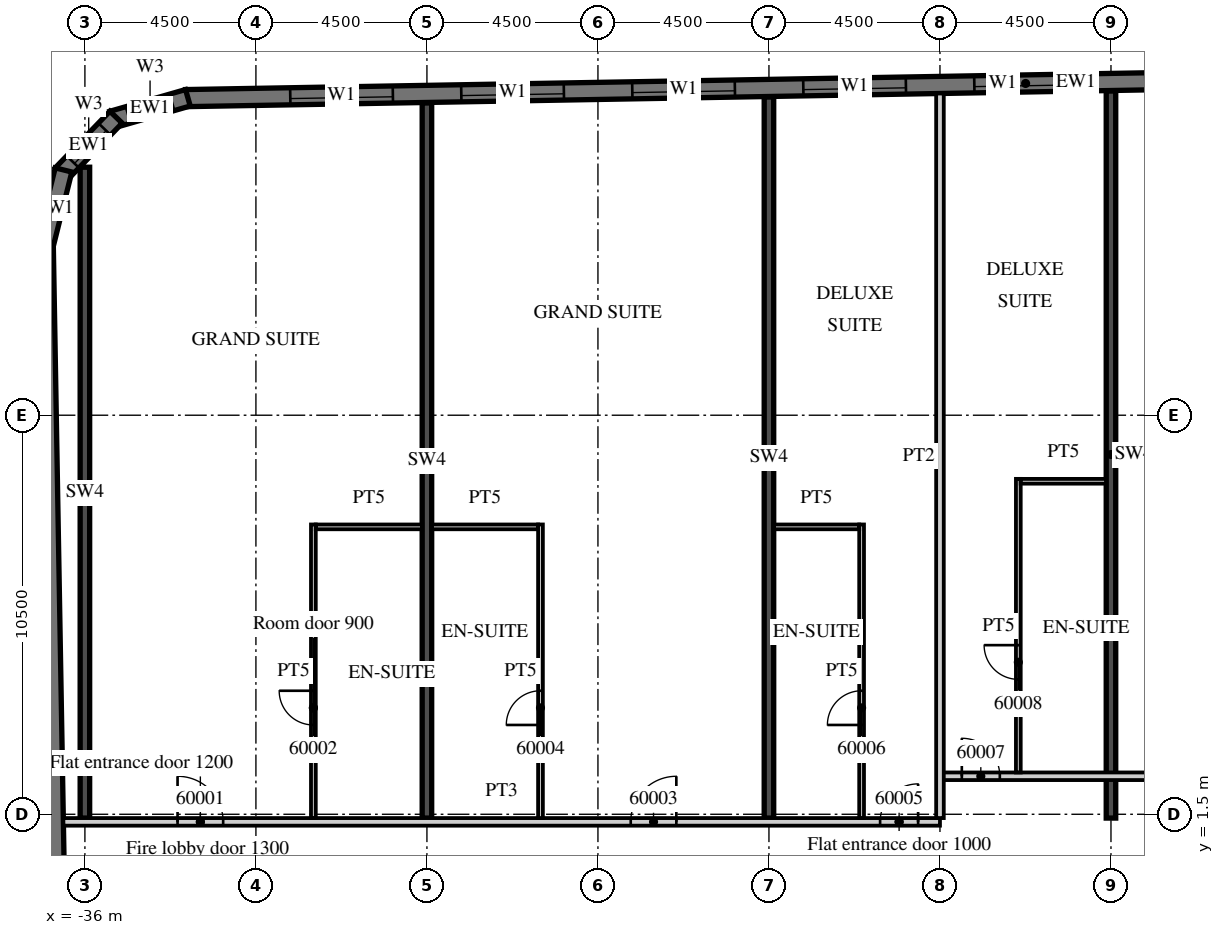
"""IFC4 building model, lengths in metres.
Left out: names, types, materials, properties, quantities, classifications, styles, units other than length and angle.
Written with IfcOpenShell. Run it as: python <this file> out.ifc"""

import sys

from ifc_helpers import new_model, si_unit, direction, frame, frame_2d, origin, place, context, subcontext, project, spatial, polyline, rectangle, outline, extrude, element, fill, save


model = new_model("IFC4")
c1 = context("Model", 3, precision=1e-05, world=origin(), true_north=direction((0.0, 1.0)))
c2 = subcontext(c1, "Body", "Model", "MODEL_VIEW")
j1 = project(units=[si_unit("LENGTHUNIT", "METRE"), si_unit("PLANEANGLEUNIT", "RADIAN")], contexts=[c1])
p1 = place(None, origin())
s1 = spatial("IfcSite", under=j1, at=p1, CompositionType="ELEMENT")
p2 = place(p1, origin())
s2 = spatial("IfcBuilding", under=s1, at=p2, CompositionType="ELEMENT")
p3 = place(p2, frame((0.0, 0.0, 244.1)))
s3 = spatial("IfcBuildingStorey", under=s2, at=p3, CompositionType="ELEMENT", Elevation=244.1)
p4 = place(p3, frame((-36.0, 1.4, 0.0), z_axis=(0.0, 0.0, 1.0), x_axis=(0.0, 1.0, 0.0)))
e1 = element("IfcWall", 1, at=p4, inside=s3, PredefinedType="SHEAR", context=c2, shape_type="SweptSolid", body=[
    extrude(rectangle(XDim=17.125, YDim=0.25, at=frame_2d((8.563, 0.0))), origin(), (0.0, 0.0, 1.0), 3.3),
])
p5 = place(p3, frame((-27.0, 1.4, 0.0), z_axis=(0.0, 0.0, 1.0), x_axis=(0.0, 1.0, 0.0)))
e2 = element("IfcWall", 2, at=p5, inside=s3, PredefinedType="SHEAR", context=c2, shape_type="SweptSolid", body=[
    extrude(rectangle(XDim=18.817, YDim=0.25, at=frame_2d((9.409, 0.0))), origin(), (0.0, 0.0, 1.0), 3.3),
])
p6 = place(p3, frame((-18.0, 1.4, 0.0), z_axis=(0.0, 0.0, 1.0), x_axis=(0.0, 1.0, 0.0)))
e3 = element("IfcWall", 3, at=p6, inside=s3, PredefinedType="SHEAR", context=c2, shape_type="SweptSolid", body=[
    extrude(rectangle(XDim=18.974, YDim=0.25, at=frame_2d((9.487, 0.0))), origin(), (0.0, 0.0, 1.0), 3.3),
])
p7 = place(p3, frame((-9.0, 1.4, 0.0), z_axis=(0.0, 0.0, 1.0), x_axis=(0.0, 1.0, 0.0)))
e4 = element("IfcWall", 4, at=p7, inside=s3, PredefinedType="SHEAR", context=c2, shape_type="SweptSolid", body=[
    extrude(rectangle(XDim=19.132, YDim=0.25, at=frame_2d((9.566, 0.0))), origin(), (0.0, 0.0, 1.0), 3.3),
])
p8 = place(p3, frame((-37.057, 16.503, 0.0), z_axis=(0.0, 0.0, 1.0), x_axis=(0.017452279857, -0.999847697366, 0.0)))
e5 = element("IfcWall", 5, at=p8, inside=s3, PredefinedType="SOLIDWALL", context=c2, shape_type="SweptSolid", body=[
    extrude(rectangle(XDim=33.0, YDim=0.45, at=frame_2d((16.5, 0.0))), origin(), (0.0, 0.0, 1.0), 3.02),
])
p9 = place(p3, frame((13.504, 21.161, 0.0), z_axis=(0.0, 0.0, 1.0), x_axis=(-0.999847763257, -0.017448504532, 0.0)))
e6 = element("IfcWall", 6, at=p9, inside=s3, PredefinedType="SOLIDWALL", context=c2, shape_type="SweptSolid", body=[
    extrude(rectangle(XDim=46.859, YDim=0.45, at=frame_2d((23.43, 0.0))), origin(), (0.0, 0.0, 1.0), 3.02),
])
p10 = place(p9, frame((0.9, 0.0, 0.45)))
e7 = element("IfcOpeningElement", 7, at=p10, cuts=e6, PredefinedType="OPENING", context=c2, shape_type="SweptSolid", body=[
    extrude(rectangle(XDim=2.7, YDim=2.25, at=frame_2d((1.35, 1.125))), frame((0.0, 0.235, 0.0), z_axis=(0.0, -1.0, 0.0), x_axis=(1.0, 0.0, 0.0)), (0.0, 0.0, 1.0), 0.47),
])
p11 = place(p9, frame((5.401, 0.0, 0.45)))
e8 = element("IfcOpeningElement", 8, at=p11, cuts=e6, PredefinedType="OPENING", context=c2, shape_type="SweptSolid", body=[
    extrude(rectangle(XDim=2.7, YDim=2.25, at=frame_2d((1.35, 1.125))), frame((0.0, 0.235, 0.0), z_axis=(0.0, -1.0, 0.0), x_axis=(1.0, 0.0, 0.0)), (0.0, 0.0, 1.0), 0.47),
])
p12 = place(p9, frame((9.902, 0.0, 0.45)))
e9 = element("IfcOpeningElement", 9, at=p12, cuts=e6, PredefinedType="OPENING", context=c2, shape_type="SweptSolid", body=[
    extrude(rectangle(XDim=2.7, YDim=2.25, at=frame_2d((1.35, 1.125))), frame((0.0, 0.235, 0.0), z_axis=(0.0, -1.0, 0.0), x_axis=(1.0, 0.0, 0.0)), (0.0, 0.0, 1.0), 0.47),
])
p13 = place(p9, frame((14.402, 0.0, 0.45)))
e10 = element("IfcOpeningElement", 10, at=p13, cuts=e6, PredefinedType="OPENING", context=c2, shape_type="SweptSolid", body=[
    extrude(rectangle(XDim=2.7, YDim=2.25, at=frame_2d((1.35, 1.125))), frame((0.0, 0.235, 0.0), z_axis=(0.0, -1.0, 0.0), x_axis=(1.0, 0.0, 0.0)), (0.0, 0.0, 1.0), 0.47),
])
p14 = place(p9, frame((18.903, 0.0, 0.45)))
e11 = element("IfcOpeningElement", 11, at=p14, cuts=e6, PredefinedType="OPENING", context=c2, shape_type="SweptSolid", body=[
    extrude(rectangle(XDim=2.7, YDim=2.25, at=frame_2d((1.35, 1.125))), frame((0.0, 0.235, 0.0), z_axis=(0.0, -1.0, 0.0), x_axis=(1.0, 0.0, 0.0)), (0.0, 0.0, 1.0), 0.47),
])
p15 = place(p9, frame((23.404, 0.0, 0.45)))
e12 = element("IfcOpeningElement", 12, at=p15, cuts=e6, PredefinedType="OPENING", context=c2, shape_type="SweptSolid", body=[
    extrude(rectangle(XDim=2.7, YDim=2.25, at=frame_2d((1.35, 1.125))), frame((0.0, 0.235, 0.0), z_axis=(0.0, -1.0, 0.0), x_axis=(1.0, 0.0, 0.0)), (0.0, 0.0, 1.0), 0.47),
])
p16 = place(p9, frame((27.904, 0.0, 0.45)))
e13 = element("IfcOpeningElement", 13, at=p16, cuts=e6, PredefinedType="OPENING", context=c2, shape_type="SweptSolid", body=[
    extrude(rectangle(XDim=2.7, YDim=2.25, at=frame_2d((1.35, 1.125))), frame((0.0, 0.235, 0.0), z_axis=(0.0, -1.0, 0.0), x_axis=(1.0, 0.0, 0.0)), (0.0, 0.0, 1.0), 0.47),
])
p17 = place(p9, frame((32.405, 0.0, 0.45)))
e14 = element("IfcOpeningElement", 14, at=p17, cuts=e6, PredefinedType="OPENING", context=c2, shape_type="SweptSolid", body=[
    extrude(rectangle(XDim=2.7, YDim=2.25, at=frame_2d((1.35, 1.125))), frame((0.0, 0.235, 0.0), z_axis=(0.0, -1.0, 0.0), x_axis=(1.0, 0.0, 0.0)), (0.0, 0.0, 1.0), 0.47),
])
p18 = place(p9, frame((36.906, 0.0, 0.45)))
e15 = element("IfcOpeningElement", 15, at=p18, cuts=e6, PredefinedType="OPENING", context=c2, shape_type="SweptSolid", body=[
    extrude(rectangle(XDim=2.7, YDim=2.25, at=frame_2d((1.35, 1.125))), frame((0.0, 0.235, 0.0), z_axis=(0.0, -1.0, 0.0), x_axis=(1.0, 0.0, 0.0)), (0.0, 0.0, 1.0), 0.47),
])
p19 = place(p9, frame((41.406, 0.0, 0.45)))
e16 = element("IfcOpeningElement", 16, at=p19, cuts=e6, PredefinedType="OPENING", context=c2, shape_type="SweptSolid", body=[
    extrude(rectangle(XDim=2.7, YDim=2.25, at=frame_2d((1.35, 1.125))), frame((0.0, 0.235, 0.0), z_axis=(0.0, -1.0, 0.0), x_axis=(1.0, 0.0, 0.0)), (0.0, 0.0, 1.0), 0.47),
])
p20 = place(p3, frame((-33.29, 20.352, 0.0), z_axis=(0.0, 0.0, 1.0), x_axis=(-0.961247584925, -0.275686562016, 0.0)))
e17 = element("IfcWall", 17, at=p20, inside=s3, PredefinedType="SOLIDWALL", context=c2, shape_type="SweptSolid", body=[
    extrude(outline(polyline([(0.0, -0.225), (2.071, -0.225), (1.95, 0.225), (0.121, 0.225), (0.0, -0.225)])), origin(), (0.0, 0.0, 1.0), 3.02),
])
p21 = place(p20, frame((0.435, 0.0, 0.45)))
e18 = element("IfcOpeningElement", 18, at=p21, cuts=e17, PredefinedType="OPENING", context=c2, shape_type="SweptSolid", body=[
    extrude(rectangle(XDim=1.2, YDim=2.25, at=frame_2d((0.6, 1.125))), frame((0.0, 0.235, 0.0), z_axis=(0.0, -1.0, 0.0), x_axis=(1.0, 0.0, 0.0)), (0.0, 0.0, 1.0), 0.47),
])
p22 = place(p3, frame((-35.181, 19.842, 0.0), z_axis=(0.0, 0.0, 1.0), x_axis=(-0.694678672846, -0.719320193998, 0.0)))
e19 = element("IfcWall", 19, at=p22, inside=s3, PredefinedType="SOLIDWALL", context=c2, shape_type="SweptSolid", body=[
    extrude(outline(polyline([(0.0, -0.225), (2.071, -0.225), (1.95, 0.225), (0.121, 0.225), (0.0, -0.225)])), origin(), (0.0, 0.0, 1.0), 3.02),
])
p23 = place(p22, frame((0.435, 0.0, 0.45)))
e20 = element("IfcOpeningElement", 20, at=p23, cuts=e19, PredefinedType="OPENING", context=c2, shape_type="SweptSolid", body=[
    extrude(rectangle(XDim=1.2, YDim=2.25, at=frame_2d((0.6, 1.125))), frame((0.0, 0.235, 0.0), z_axis=(0.0, -1.0, 0.0), x_axis=(1.0, 0.0, 0.0)), (0.0, 0.0, 1.0), 0.47),
])
p24 = place(p3, frame((-36.563, 18.454, 0.0), z_axis=(0.0, 0.0, 1.0), x_axis=(-0.241869623482, -0.970308757683, 0.0)))
e21 = element("IfcWall", 21, at=p24, inside=s3, PredefinedType="SOLIDWALL", context=c2, shape_type="SweptSolid", body=[
    extrude(outline(polyline([(-0.0, -0.225), (2.07, -0.225), (1.95, 0.225), (0.12, 0.225), (-0.0, -0.225)])), origin(), (0.0, 0.0, 1.0), 3.02),
])
p25 = place(p3, frame((-36.566, 1.3, 0.0), z_axis=(0.0, 0.0, 1.0), x_axis=(1.0, 0.0, 0.0)))
e22 = element("IfcWall", 22, at=p25, inside=s3, PredefinedType="PARTITIONING", context=c2, shape_type="SweptSolid", body=[
    extrude(rectangle(XDim=23.066, YDim=0.2, at=frame_2d((11.533, 0.0))), origin(), (0.0, 0.0, 1.0), 3.02),
])
p26 = place(p25, frame((3.004, 0.0, 0.0)))
e23 = element("IfcOpeningElement", 23, at=p26, cuts=e22, PredefinedType="OPENING", context=c2, shape_type="SweptSolid", body=[
    extrude(rectangle(XDim=1.2, YDim=2.1, at=frame_2d((0.6, 1.05))), frame((0.0, 0.11, 0.0), z_axis=(0.0, -1.0, 0.0), x_axis=(1.0, 0.0, 0.0)), (0.0, 0.0, 1.0), 0.22),
])
p27 = place(p25, frame((14.929, 0.0, 0.0)))
e24 = element("IfcOpeningElement", 24, at=p27, cuts=e22, PredefinedType="OPENING", context=c2, shape_type="SweptSolid", body=[
    extrude(rectangle(XDim=1.2, YDim=2.1, at=frame_2d((0.6, 1.05))), frame((0.0, 0.11, 0.0), z_axis=(0.0, -1.0, 0.0), x_axis=(1.0, 0.0, 0.0)), (0.0, 0.0, 1.0), 0.22),
])
p28 = place(p25, frame((21.491, 0.0, 0.0)))
e25 = element("IfcOpeningElement", 25, at=p28, cuts=e22, PredefinedType="OPENING", context=c2, shape_type="SweptSolid", body=[
    extrude(rectangle(XDim=1.0, YDim=2.1, at=frame_2d((0.5, 1.05))), frame((0.0, 0.11, 0.0), z_axis=(0.0, -1.0, 0.0), x_axis=(1.0, 0.0, 0.0)), (0.0, 0.0, 1.0), 0.22),
])
p29 = place(p3, frame((-13.5, 2.5, 0.0), z_axis=(0.0, 0.0, 1.0), x_axis=(1.0, 0.0, 0.0)))
e26 = element("IfcWall", 26, at=p29, inside=s3, PredefinedType="PARTITIONING", context=c2, shape_type="SweptSolid", body=[
    extrude(rectangle(XDim=27.0, YDim=0.2, at=frame_2d((13.5, 0.0))), origin(), (0.0, 0.0, 1.0), 3.02),
])
p30 = place(p29, frame((0.575, 0.0, 0.0)))
e27 = element("IfcOpeningElement", 27, at=p30, cuts=e26, PredefinedType="OPENING", context=c2, shape_type="SweptSolid", body=[
    extrude(rectangle(XDim=1.0, YDim=2.1, at=frame_2d((0.5, 1.05))), frame((0.0, 0.11, 0.0), z_axis=(0.0, -1.0, 0.0), x_axis=(1.0, 0.0, 0.0)), (0.0, 0.0, 1.0), 0.22),
])
p31 = place(p29, frame((6.938, 0.0, 0.0)))
e28 = element("IfcOpeningElement", 28, at=p31, cuts=e26, PredefinedType="OPENING", context=c2, shape_type="SweptSolid", body=[
    extrude(rectangle(XDim=1.2, YDim=2.1, at=frame_2d((0.6, 1.05))), frame((0.0, 0.11, 0.0), z_axis=(0.0, -1.0, 0.0), x_axis=(1.0, 0.0, 0.0)), (0.0, 0.0, 1.0), 0.22),
])
p32 = place(p29, frame((15.938, 0.0, 0.0)))
e29 = element("IfcOpeningElement", 29, at=p32, cuts=e26, PredefinedType="OPENING", context=c2, shape_type="SweptSolid", body=[
    extrude(rectangle(XDim=1.2, YDim=2.1, at=frame_2d((0.6, 1.05))), frame((0.0, 0.11, 0.0), z_axis=(0.0, -1.0, 0.0), x_axis=(1.0, 0.0, 0.0)), (0.0, 0.0, 1.0), 0.22),
])
p33 = place(p29, frame((23.075, 0.0, 0.0)))
e30 = element("IfcOpeningElement", 30, at=p33, cuts=e26, PredefinedType="OPENING", context=c2, shape_type="SweptSolid", body=[
    extrude(rectangle(XDim=1.0, YDim=2.1, at=frame_2d((0.5, 1.05))), frame((0.0, 0.11, 0.0), z_axis=(0.0, -1.0, 0.0), x_axis=(1.0, 0.0, 0.0)), (0.0, 0.0, 1.0), 0.22),
])
p34 = place(p3, frame((-29.988, 1.4, 0.0), z_axis=(0.0, 0.0, 1.0), x_axis=(0.0, 1.0, 0.0)))
e31 = element("IfcWall", 31, at=p34, inside=s3, PredefinedType="PARTITIONING", context=c2, shape_type="SweptSolid", body=[
    extrude(rectangle(XDim=7.725, YDim=0.125, at=frame_2d((3.863, 0.0))), origin(), (0.0, 0.0, 1.0), 3.02),
])
p35 = place(p34, frame((2.45, 0.0, 0.0)))
e32 = element("IfcOpeningElement", 32, at=p35, cuts=e31, PredefinedType="OPENING", context=c2, shape_type="SweptSolid", body=[
    extrude(rectangle(XDim=0.9, YDim=2.1, at=frame_2d((0.45, 1.05))), frame((0.0, 0.073, 0.0), z_axis=(0.0, -1.0, 0.0), x_axis=(1.0, 0.0, 0.0)), (0.0, 0.0, 1.0), 0.145),
])
p36 = place(p3, frame((-29.925, 9.062, 0.0), z_axis=(0.0, 0.0, 1.0), x_axis=(1.0, 0.0, 0.0)))
e33 = element("IfcWall", 33, at=p36, inside=s3, PredefinedType="PARTITIONING", context=c2, shape_type="SweptSolid", body=[
    extrude(rectangle(XDim=2.8, YDim=0.125, at=frame_2d((1.4, 0.0))), origin(), (0.0, 0.0, 1.0), 3.02),
])
p37 = place(p3, frame((-24.012, 1.4, 0.0), z_axis=(0.0, 0.0, 1.0), x_axis=(0.0, 1.0, 0.0)))
e34 = element("IfcWall", 34, at=p37, inside=s3, PredefinedType="PARTITIONING", context=c2, shape_type="SweptSolid", body=[
    extrude(rectangle(XDim=7.725, YDim=0.125, at=frame_2d((3.863, 0.0))), origin(), (0.0, 0.0, 1.0), 3.02),
])
p38 = place(p37, frame((2.45, 0.0, 0.0)))
e35 = element("IfcOpeningElement", 35, at=p38, cuts=e34, PredefinedType="OPENING", context=c2, shape_type="SweptSolid", body=[
    extrude(rectangle(XDim=0.9, YDim=2.1, at=frame_2d((0.45, 1.05))), frame((0.0, 0.073, 0.0), z_axis=(0.0, -1.0, 0.0), x_axis=(1.0, 0.0, 0.0)), (0.0, 0.0, 1.0), 0.145),
])
p39 = place(p3, frame((-26.875, 9.062, 0.0), z_axis=(0.0, 0.0, 1.0), x_axis=(1.0, 0.0, 0.0)))
e36 = element("IfcWall", 36, at=p39, inside=s3, PredefinedType="PARTITIONING", context=c2, shape_type="SweptSolid", body=[
    extrude(rectangle(XDim=2.8, YDim=0.125, at=frame_2d((1.4, 0.0))), origin(), (0.0, 0.0, 1.0), 3.02),
])
p40 = place(p3, frame((-13.5, 1.4, 0.0), z_axis=(0.0, 0.0, 1.0), x_axis=(0.0, 1.0, 0.0)))
e37 = element("IfcWall", 37, at=p40, inside=s3, PredefinedType="PARTITIONING", context=c2, shape_type="SweptSolid", body=[
    extrude(rectangle(XDim=19.065, YDim=0.2, at=frame_2d((9.533, 0.0))), origin(), (0.0, 0.0, 1.0), 3.02),
])
p41 = place(p3, frame((-15.562, 1.4, 0.0), z_axis=(0.0, 0.0, 1.0), x_axis=(0.0, 1.0, 0.0)))
e38 = element("IfcWall", 38, at=p41, inside=s3, PredefinedType="PARTITIONING", context=c2, shape_type="SweptSolid", body=[
    extrude(rectangle(XDim=7.725, YDim=0.125, at=frame_2d((3.863, 0.0))), origin(), (0.0, 0.0, 1.0), 3.02),
])
p42 = place(p41, frame((2.45, 0.0, 0.0)))
e39 = element("IfcOpeningElement", 39, at=p42, cuts=e38, PredefinedType="OPENING", context=c2, shape_type="SweptSolid", body=[
    extrude(rectangle(XDim=0.9, YDim=2.1, at=frame_2d((0.45, 1.05))), frame((0.0, 0.073, 0.0), z_axis=(0.0, -1.0, 0.0), x_axis=(1.0, 0.0, 0.0)), (0.0, 0.0, 1.0), 0.145),
])
p43 = place(p3, frame((-17.875, 9.062, 0.0), z_axis=(0.0, 0.0, 1.0), x_axis=(1.0, 0.0, 0.0)))
e40 = element("IfcWall", 40, at=p43, inside=s3, PredefinedType="PARTITIONING", context=c2, shape_type="SweptSolid", body=[
    extrude(rectangle(XDim=2.25, YDim=0.125, at=frame_2d((1.125, 0.0))), origin(), (0.0, 0.0, 1.0), 3.02),
])
p44 = place(p3, frame((-11.438, 2.6, 0.0), z_axis=(0.0, 0.0, 1.0), x_axis=(0.0, 1.0, 0.0)))
e41 = element("IfcWall", 41, at=p44, inside=s3, PredefinedType="PARTITIONING", context=c2, shape_type="SweptSolid", body=[
    extrude(rectangle(XDim=7.725, YDim=0.125, at=frame_2d((3.862, 0.0))), origin(), (0.0, 0.0, 1.0), 3.02),
])
p45 = place(p44, frame((2.45, 0.0, 0.0)))
e42 = element("IfcOpeningElement", 42, at=p45, cuts=e41, PredefinedType="OPENING", context=c2, shape_type="SweptSolid", body=[
    extrude(rectangle(XDim=0.9, YDim=2.1, at=frame_2d((0.45, 1.05))), frame((0.0, 0.073, 0.0), z_axis=(0.0, -1.0, 0.0), x_axis=(1.0, 0.0, 0.0)), (0.0, 0.0, 1.0), 0.145),
])
p46 = place(p3, frame((-11.375, 10.262, 0.0), z_axis=(0.0, 0.0, 1.0), x_axis=(1.0, 0.0, 0.0)))
e43 = element("IfcWall", 43, at=p46, inside=s3, PredefinedType="PARTITIONING", context=c2, shape_type="SweptSolid", body=[
    extrude(rectangle(XDim=2.25, YDim=0.125, at=frame_2d((1.125, 0.0))), origin(), (0.0, 0.0, 1.0), 3.02),
])
p47 = place(p15, origin())
e44 = element("IfcWindow", 44, at=p47, inside=s3, PartitioningType="SINGLE_PANEL", PredefinedType="WINDOW", context=c2, shape_type="SweptSolid", body=[
    extrude(rectangle(XDim=2.7, YDim=2.25, at=frame_2d((1.35, 1.125))), frame((0.0, 0.09, 0.0), z_axis=(0.0, -1.0, 0.0), x_axis=(1.0, 0.0, 0.0)), (0.0, 0.0, 1.0), 0.06),
])
fill(e12, e44)
p48 = place(p16, origin())
e45 = element("IfcWindow", 45, at=p48, inside=s3, PartitioningType="SINGLE_PANEL", PredefinedType="WINDOW", context=c2, shape_type="SweptSolid", body=[
    extrude(rectangle(XDim=2.7, YDim=2.25, at=frame_2d((1.35, 1.125))), frame((0.0, 0.09, 0.0), z_axis=(0.0, -1.0, 0.0), x_axis=(1.0, 0.0, 0.0)), (0.0, 0.0, 1.0), 0.06),
])
fill(e13, e45)
p49 = place(p17, origin())
e46 = element("IfcWindow", 46, at=p49, inside=s3, PartitioningType="SINGLE_PANEL", PredefinedType="WINDOW", context=c2, shape_type="SweptSolid", body=[
    extrude(rectangle(XDim=2.7, YDim=2.25, at=frame_2d((1.35, 1.125))), frame((0.0, 0.09, 0.0), z_axis=(0.0, -1.0, 0.0), x_axis=(1.0, 0.0, 0.0)), (0.0, 0.0, 1.0), 0.06),
])
fill(e14, e46)
p50 = place(p18, origin())
e47 = element("IfcWindow", 47, at=p50, inside=s3, PartitioningType="SINGLE_PANEL", PredefinedType="WINDOW", context=c2, shape_type="SweptSolid", body=[
    extrude(rectangle(XDim=2.7, YDim=2.25, at=frame_2d((1.35, 1.125))), frame((0.0, 0.09, 0.0), z_axis=(0.0, -1.0, 0.0), x_axis=(1.0, 0.0, 0.0)), (0.0, 0.0, 1.0), 0.06),
])
fill(e15, e47)
p51 = place(p19, origin())
e48 = element("IfcWindow", 48, at=p51, inside=s3, PartitioningType="SINGLE_PANEL", PredefinedType="WINDOW", context=c2, shape_type="SweptSolid", body=[
    extrude(rectangle(XDim=2.7, YDim=2.25, at=frame_2d((1.35, 1.125))), frame((0.0, 0.09, 0.0), z_axis=(0.0, -1.0, 0.0), x_axis=(1.0, 0.0, 0.0)), (0.0, 0.0, 1.0), 0.06),
])
fill(e16, e48)
p52 = place(p21, origin())
e49 = element("IfcWindow", 49, at=p52, inside=s3, PartitioningType="SINGLE_PANEL", PredefinedType="WINDOW", context=c2, shape_type="SweptSolid", body=[
    extrude(rectangle(XDim=1.2, YDim=2.25, at=frame_2d((0.6, 1.125))), frame((0.0, 0.09, 0.0), z_axis=(0.0, -1.0, 0.0), x_axis=(1.0, 0.0, 0.0)), (0.0, 0.0, 1.0), 0.06),
])
fill(e18, e49)
p53 = place(p23, origin())
e50 = element("IfcWindow", 50, at=p53, inside=s3, PartitioningType="SINGLE_PANEL", PredefinedType="WINDOW", context=c2, shape_type="SweptSolid", body=[
    extrude(rectangle(XDim=1.2, YDim=2.25, at=frame_2d((0.6, 1.125))), frame((0.0, 0.09, 0.0), z_axis=(0.0, -1.0, 0.0), x_axis=(1.0, 0.0, 0.0)), (0.0, 0.0, 1.0), 0.06),
])
fill(e20, e50)
p54 = place(p26, origin())
e51 = element("IfcDoor", 51, at=p54, inside=s3, OperationType="SINGLE_SWING_LEFT", PredefinedType="DOOR", context=c2, shape_type="SweptSolid", body=[
    extrude(rectangle(XDim=1.2, YDim=2.1, at=frame_2d((0.6, 1.05))), frame((0.0, 0.025, 0.0), z_axis=(0.0, -1.0, 0.0), x_axis=(1.0, 0.0, 0.0)), (0.0, 0.0, 1.0), 0.05),
])
fill(e23, e51)
p55 = place(p35, origin())
e52 = element("IfcDoor", 52, at=p55, inside=s3, OperationType="SINGLE_SWING_RIGHT", PredefinedType="DOOR", context=c2, shape_type="SweptSolid", body=[
    extrude(rectangle(XDim=0.9, YDim=2.1, at=frame_2d((0.45, 1.05))), frame((0.0, 0.025, 0.0), z_axis=(0.0, -1.0, 0.0), x_axis=(1.0, 0.0, 0.0)), (0.0, 0.0, 1.0), 0.05),
])
fill(e32, e52)
p56 = place(p27, origin())
e53 = element("IfcDoor", 53, at=p56, inside=s3, OperationType="SINGLE_SWING_RIGHT", PredefinedType="DOOR", context=c2, shape_type="SweptSolid", body=[
    extrude(rectangle(XDim=1.2, YDim=2.1, at=frame_2d((0.6, 1.05))), frame((0.0, 0.025, 0.0), z_axis=(0.0, -1.0, 0.0), x_axis=(1.0, 0.0, 0.0)), (0.0, 0.0, 1.0), 0.05),
])
fill(e24, e53)
p57 = place(p38, origin())
e54 = element("IfcDoor", 54, at=p57, inside=s3, OperationType="SINGLE_SWING_LEFT", PredefinedType="DOOR", context=c2, shape_type="SweptSolid", body=[
    extrude(rectangle(XDim=0.9, YDim=2.1, at=frame_2d((0.45, 1.05))), frame((0.0, 0.025, 0.0), z_axis=(0.0, -1.0, 0.0), x_axis=(1.0, 0.0, 0.0)), (0.0, 0.0, 1.0), 0.05),
])
fill(e35, e54)
p58 = place(p28, origin())
e55 = element("IfcDoor", 55, at=p58, inside=s3, OperationType="SINGLE_SWING_RIGHT", PredefinedType="DOOR", context=c2, shape_type="SweptSolid", body=[
    extrude(rectangle(XDim=1.0, YDim=2.1, at=frame_2d((0.5, 1.05))), frame((0.0, 0.025, 0.0), z_axis=(0.0, -1.0, 0.0), x_axis=(1.0, 0.0, 0.0)), (0.0, 0.0, 1.0), 0.05),
])
fill(e25, e55)
p59 = place(p42, origin())
e56 = element("IfcDoor", 56, at=p59, inside=s3, OperationType="SINGLE_SWING_LEFT", PredefinedType="DOOR", context=c2, shape_type="SweptSolid", body=[
    extrude(rectangle(XDim=0.9, YDim=2.1, at=frame_2d((0.45, 1.05))), frame((0.0, 0.025, 0.0), z_axis=(0.0, -1.0, 0.0), x_axis=(1.0, 0.0, 0.0)), (0.0, 0.0, 1.0), 0.05),
])
fill(e39, e56)
p60 = place(p30, origin())
e57 = element("IfcDoor", 57, at=p60, inside=s3, OperationType="SINGLE_SWING_LEFT", PredefinedType="DOOR", context=c2, shape_type="SweptSolid", body=[
    extrude(rectangle(XDim=1.0, YDim=2.1, at=frame_2d((0.5, 1.05))), frame((0.0, 0.025, 0.0), z_axis=(0.0, -1.0, 0.0), x_axis=(1.0, 0.0, 0.0)), (0.0, 0.0, 1.0), 0.05),
])
fill(e27, e57)
p61 = place(p45, origin())
e58 = element("IfcDoor", 58, at=p61, inside=s3, OperationType="SINGLE_SWING_RIGHT", PredefinedType="DOOR", context=c2, shape_type="SweptSolid", body=[
    extrude(rectangle(XDim=0.9, YDim=2.1, at=frame_2d((0.45, 1.05))), frame((0.0, 0.025, 0.0), z_axis=(0.0, -1.0, 0.0), x_axis=(1.0, 0.0, 0.0)), (0.0, 0.0, 1.0), 0.05),
])
fill(e42, e58)
save(model, sys.argv[1])
